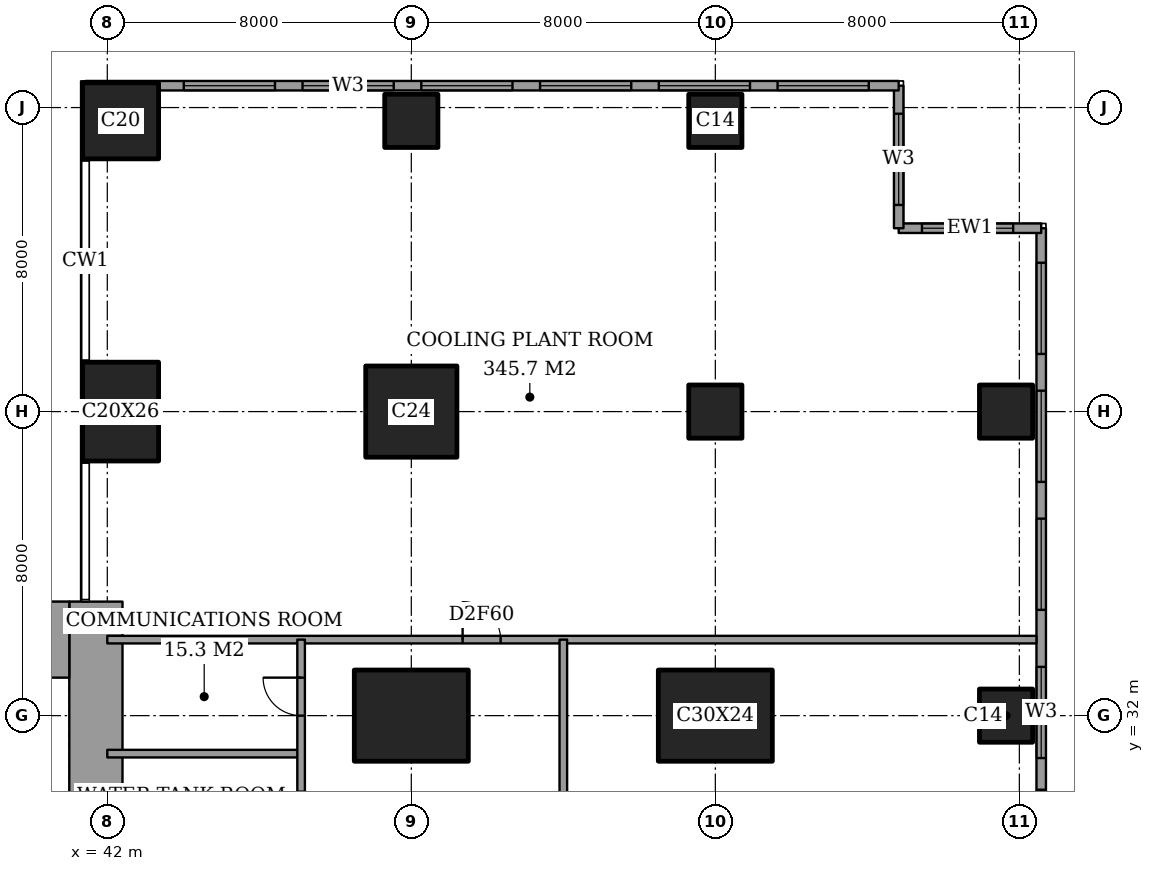
"""IFC4 building model, lengths in metres.
Left out: names, types, materials, properties, quantities, classifications, styles, units other than length and angle.
Written with IfcOpenShell. Run it as: python <this file> out.ifc"""

import sys

from ifc_helpers import new_model, si_unit, direction, frame, frame_2d, origin, origin_2d, place, context, subcontext, project, spatial, rectangle, extrude, element, fill, save


model = new_model("IFC4")
c1 = context("Model", 3, precision=1e-05, world=origin(), true_north=direction((0.0, 1.0)))
c2 = subcontext(c1, "Body", "Model", "MODEL_VIEW")
j1 = project(units=[si_unit("LENGTHUNIT", "METRE"), si_unit("PLANEANGLEUNIT", "RADIAN")], contexts=[c1])
p1 = place(None, origin())
s1 = spatial("IfcSite", under=j1, at=p1, CompositionType="ELEMENT")
p2 = place(p1, origin())
s2 = spatial("IfcBuilding", under=s1, at=p2, CompositionType="ELEMENT")
p3 = place(p2, frame((0.0, 0.0, 296.6)))
s3 = spatial("IfcBuildingStorey", under=s2, at=p3, CompositionType="ELEMENT", Elevation=296.6)
p4 = place(p3, frame((42.35, 40.0, 0.0), z_axis=(0.0, 0.0, 1.0), x_axis=(1.0, 0.0, 0.0)))
e1 = element("IfcColumn", 1, at=p4, inside=s3, PredefinedType="COLUMN", context=c2, shape_type="SweptSolid", body=[
    extrude(rectangle(XDim=2.0, YDim=2.6, at=origin_2d()), origin(), (0.0, 0.0, 1.0), 5.0),
])
p5 = place(p3, frame((42.35, 47.65, 0.0), z_axis=(0.0, 0.0, 1.0), x_axis=(1.0, 0.0, 0.0)))
e2 = element("IfcColumn", 2, at=p5, inside=s3, PredefinedType="COLUMN", context=c2, shape_type="SweptSolid", body=[
    extrude(rectangle(XDim=2.0, YDim=2.0, at=origin_2d()), origin(), (0.0, 0.0, 1.0), 5.0),
])
p6 = place(p3, frame((50.0, 32.0, 0.0), z_axis=(0.0, 0.0, 1.0), x_axis=(1.0, 0.0, 0.0)))
e3 = element("IfcColumn", 3, at=p6, inside=s3, PredefinedType="COLUMN", context=c2, shape_type="SweptSolid", body=[
    extrude(rectangle(XDim=3.0, YDim=2.4, at=origin_2d()), origin(), (0.0, 0.0, 1.0), 5.0),
])
p7 = place(p3, frame((50.0, 40.0, 0.0), z_axis=(0.0, 0.0, 1.0), x_axis=(1.0, 0.0, 0.0)))
e4 = element("IfcColumn", 4, at=p7, inside=s3, PredefinedType="COLUMN", context=c2, shape_type="SweptSolid", body=[
    extrude(rectangle(XDim=2.4, YDim=2.4, at=origin_2d()), origin(), (0.0, 0.0, 1.0), 5.0),
])
p8 = place(p3, frame((50.0, 47.65, 0.0), z_axis=(0.0, 0.0, 1.0), x_axis=(1.0, 0.0, 0.0)))
e5 = element("IfcColumn", 5, at=p8, inside=s3, PredefinedType="COLUMN", context=c2, shape_type="SweptSolid", body=[
    extrude(rectangle(XDim=1.4, YDim=1.4, at=origin_2d()), origin(), (0.0, 0.0, 1.0), 5.0),
])
p9 = place(p3, frame((58.0, 32.0, 0.0), z_axis=(0.0, 0.0, 1.0), x_axis=(1.0, 0.0, 0.0)))
e6 = element("IfcColumn", 6, at=p9, inside=s3, PredefinedType="COLUMN", context=c2, shape_type="SweptSolid", body=[
    extrude(rectangle(XDim=3.0, YDim=2.4, at=origin_2d()), origin(), (0.0, 0.0, 1.0), 5.0),
])
for number, where, z_axis, x_axis in (
    (7, (58.0, 40.0, 0.0), (0.0, 0.0, 1.0), (1.0, 0.0, 0.0)),
    (8, (58.0, 47.65, 0.0), (0.0, 0.0, 1.0), (1.0, 0.0, 0.0)),
    (9, (65.65, 32.0, 0.0), (0.0, 0.0, 1.0), (1.0, 0.0, 0.0)),
    (10, (65.65, 40.0, 0.0), (0.0, 0.0, 1.0), (1.0, 0.0, 0.0)),
):
    element("IfcColumn", number, at=place(p3, frame(where, z_axis=z_axis, x_axis=x_axis)), inside=s3, PredefinedType="COLUMN", context=c2, shape_type="SweptSolid", body=[
        extrude(rectangle(XDim=1.4, YDim=1.4, at=origin_2d()), origin(), (0.0, 0.0, 1.0), 5.0),
    ])
p10 = place(p3, frame((37.85, 34.0, 0.0), z_axis=(0.0, 0.0, 1.0), x_axis=(1.0, 0.0, 0.0)))
e11 = element("IfcWall", 11, at=p10, inside=s3, PredefinedType="SHEAR", context=c2, shape_type="SweptSolid", body=[
    extrude(rectangle(XDim=3.15, YDim=2.0, at=frame_2d((1.575, 0.0))), origin(), (0.0, 0.0, 1.0), 5.0),
])
p11 = place(p3, frame((41.7, 24.85, 0.0), z_axis=(0.0, 0.0, 1.0), x_axis=(0.0, 1.0, 0.0)))
e12 = element("IfcWall", 12, at=p11, inside=s3, PredefinedType="SHEAR", context=c2, shape_type="SweptSolid", body=[
    extrude(rectangle(XDim=10.15, YDim=1.4, at=frame_2d((5.075, 0.0))), origin(), (0.0, 0.0, 1.0), 5.0),
])
p12 = place(p3, frame((66.575, 3.175, 0.0), z_axis=(0.0, 0.0, 1.0), x_axis=(0.0, 1.0, 0.0)))
e13 = element("IfcWall", 13, at=p12, inside=s3, PredefinedType="SOLIDWALL", context=c2, shape_type="SweptSolid", body=[
    extrude(rectangle(XDim=41.65, YDim=0.25, at=frame_2d((20.825, 0.0))), origin(), (0.0, 0.0, 1.0), 5.0),
])
p13 = place(p12, frame((0.908, 0.0, 0.6)))
e14 = element("IfcOpeningElement", 14, at=p13, cuts=e13, PredefinedType="OPENING", context=c2, shape_type="SweptSolid", body=[
    extrude(rectangle(XDim=2.4, YDim=3.0, at=frame_2d((1.2, 1.5))), frame((0.0, 0.135, 0.0), z_axis=(0.0, -1.0, 0.0), x_axis=(1.0, 0.0, 0.0)), (0.0, 0.0, 1.0), 0.27),
])
p14 = place(p12, frame((4.275, 0.0, 0.6)))
e15 = element("IfcOpeningElement", 15, at=p14, cuts=e13, PredefinedType="OPENING", context=c2, shape_type="SweptSolid", body=[
    extrude(rectangle(XDim=2.4, YDim=3.0, at=frame_2d((1.2, 1.5))), frame((0.0, 0.135, 0.0), z_axis=(0.0, -1.0, 0.0), x_axis=(1.0, 0.0, 0.0)), (0.0, 0.0, 1.0), 0.27),
])
p15 = place(p12, frame((7.642, 0.0, 0.6)))
e16 = element("IfcOpeningElement", 16, at=p15, cuts=e13, PredefinedType="OPENING", context=c2, shape_type="SweptSolid", body=[
    extrude(rectangle(XDim=2.4, YDim=3.0, at=frame_2d((1.2, 1.5))), frame((0.0, 0.135, 0.0), z_axis=(0.0, -1.0, 0.0), x_axis=(1.0, 0.0, 0.0)), (0.0, 0.0, 1.0), 0.27),
])
p16 = place(p12, frame((11.542, 0.0, 0.6)))
e17 = element("IfcOpeningElement", 17, at=p16, cuts=e13, PredefinedType="OPENING", context=c2, shape_type="SweptSolid", body=[
    extrude(rectangle(XDim=2.4, YDim=3.0, at=frame_2d((1.2, 1.5))), frame((0.0, 0.135, 0.0), z_axis=(0.0, -1.0, 0.0), x_axis=(1.0, 0.0, 0.0)), (0.0, 0.0, 1.0), 0.27),
])
p17 = place(p12, frame((14.775, 0.0, 0.6)))
e18 = element("IfcOpeningElement", 18, at=p17, cuts=e13, PredefinedType="OPENING", context=c2, shape_type="SweptSolid", body=[
    extrude(rectangle(XDim=2.4, YDim=3.0, at=frame_2d((1.2, 1.5))), frame((0.0, 0.135, 0.0), z_axis=(0.0, -1.0, 0.0), x_axis=(1.0, 0.0, 0.0)), (0.0, 0.0, 1.0), 0.27),
])
p18 = place(p12, frame((18.008, 0.0, 0.6)))
e19 = element("IfcOpeningElement", 19, at=p18, cuts=e13, PredefinedType="OPENING", context=c2, shape_type="SweptSolid", body=[
    extrude(rectangle(XDim=2.4, YDim=3.0, at=frame_2d((1.2, 1.5))), frame((0.0, 0.135, 0.0), z_axis=(0.0, -1.0, 0.0), x_axis=(1.0, 0.0, 0.0)), (0.0, 0.0, 1.0), 0.27),
])
p19 = place(p12, frame((21.242, 0.0, 0.6)))
e20 = element("IfcOpeningElement", 20, at=p19, cuts=e13, PredefinedType="OPENING", context=c2, shape_type="SweptSolid", body=[
    extrude(rectangle(XDim=2.4, YDim=3.0, at=frame_2d((1.2, 1.5))), frame((0.0, 0.135, 0.0), z_axis=(0.0, -1.0, 0.0), x_axis=(1.0, 0.0, 0.0)), (0.0, 0.0, 1.0), 0.27),
])
p20 = place(p12, frame((24.475, 0.0, 0.6)))
e21 = element("IfcOpeningElement", 21, at=p20, cuts=e13, PredefinedType="OPENING", context=c2, shape_type="SweptSolid", body=[
    extrude(rectangle(XDim=2.4, YDim=3.0, at=frame_2d((1.2, 1.5))), frame((0.0, 0.135, 0.0), z_axis=(0.0, -1.0, 0.0), x_axis=(1.0, 0.0, 0.0)), (0.0, 0.0, 1.0), 0.27),
])
p21 = place(p12, frame((27.708, 0.0, 0.6)))
e22 = element("IfcOpeningElement", 22, at=p21, cuts=e13, PredefinedType="OPENING", context=c2, shape_type="SweptSolid", body=[
    extrude(rectangle(XDim=2.4, YDim=3.0, at=frame_2d((1.2, 1.5))), frame((0.0, 0.135, 0.0), z_axis=(0.0, -1.0, 0.0), x_axis=(1.0, 0.0, 0.0)), (0.0, 0.0, 1.0), 0.27),
])
p22 = place(p12, frame((31.608, 0.0, 0.6)))
e23 = element("IfcOpeningElement", 23, at=p22, cuts=e13, PredefinedType="OPENING", context=c2, shape_type="SweptSolid", body=[
    extrude(rectangle(XDim=2.4, YDim=3.0, at=frame_2d((1.2, 1.5))), frame((0.0, 0.135, 0.0), z_axis=(0.0, -1.0, 0.0), x_axis=(1.0, 0.0, 0.0)), (0.0, 0.0, 1.0), 0.27),
])
p23 = place(p12, frame((34.975, 0.0, 0.6)))
e24 = element("IfcOpeningElement", 24, at=p23, cuts=e13, PredefinedType="OPENING", context=c2, shape_type="SweptSolid", body=[
    extrude(rectangle(XDim=2.4, YDim=3.0, at=frame_2d((1.2, 1.5))), frame((0.0, 0.135, 0.0), z_axis=(0.0, -1.0, 0.0), x_axis=(1.0, 0.0, 0.0)), (0.0, 0.0, 1.0), 0.27),
])
p24 = place(p12, frame((38.342, 0.0, 0.6)))
e25 = element("IfcOpeningElement", 25, at=p24, cuts=e13, PredefinedType="OPENING", context=c2, shape_type="SweptSolid", body=[
    extrude(rectangle(XDim=2.4, YDim=3.0, at=frame_2d((1.2, 1.5))), frame((0.0, 0.135, 0.0), z_axis=(0.0, -1.0, 0.0), x_axis=(1.0, 0.0, 0.0)), (0.0, 0.0, 1.0), 0.27),
])
p25 = place(p3, frame((66.575, 44.825, 0.0), z_axis=(0.0, 0.0, 1.0), x_axis=(-1.0, 0.0, 0.0)))
e26 = element("IfcWall", 26, at=p25, inside=s3, PredefinedType="SOLIDWALL", context=c2, shape_type="SweptSolid", body=[
    extrude(rectangle(XDim=3.75, YDim=0.25, at=frame_2d((1.875, 0.0))), origin(), (0.0, 0.0, 1.0), 5.0),
])
p26 = place(p25, frame((0.738, 0.0, 0.6)))
e27 = element("IfcOpeningElement", 27, at=p26, cuts=e26, PredefinedType="OPENING", context=c2, shape_type="SweptSolid", body=[
    extrude(rectangle(XDim=2.4, YDim=3.0, at=frame_2d((1.2, 1.5))), frame((0.0, 0.135, 0.0), z_axis=(0.0, -1.0, 0.0), x_axis=(1.0, 0.0, 0.0)), (0.0, 0.0, 1.0), 0.27),
])
p27 = place(p3, frame((62.825, 44.825, 0.0), z_axis=(0.0, 0.0, 1.0), x_axis=(0.0, 1.0, 0.0)))
e28 = element("IfcWall", 28, at=p27, inside=s3, PredefinedType="SOLIDWALL", context=c2, shape_type="SweptSolid", body=[
    extrude(rectangle(XDim=3.75, YDim=0.25, at=frame_2d((1.875, 0.0))), origin(), (0.0, 0.0, 1.0), 5.0),
])
p28 = place(p27, frame((0.613, 0.0, 0.6)))
e29 = element("IfcOpeningElement", 29, at=p28, cuts=e28, PredefinedType="OPENING", context=c2, shape_type="SweptSolid", body=[
    extrude(rectangle(XDim=2.4, YDim=3.0, at=frame_2d((1.2, 1.5))), frame((0.0, 0.135, 0.0), z_axis=(0.0, -1.0, 0.0), x_axis=(1.0, 0.0, 0.0)), (0.0, 0.0, 1.0), 0.27),
])
p29 = place(p3, frame((62.825, 48.575, 0.0), z_axis=(0.0, 0.0, 1.0), x_axis=(-1.0, 0.0, 0.0)))
e30 = element("IfcWall", 30, at=p29, inside=s3, PredefinedType="SOLIDWALL", context=c2, shape_type="SweptSolid", body=[
    extrude(rectangle(XDim=21.4, YDim=0.25, at=frame_2d((10.7, 0.0))), origin(), (0.0, 0.0, 1.0), 5.0),
])
p30 = place(p29, frame((0.788, 0.0, 0.6)))
e31 = element("IfcOpeningElement", 31, at=p30, cuts=e30, PredefinedType="OPENING", context=c2, shape_type="SweptSolid", body=[
    extrude(rectangle(XDim=2.4, YDim=3.0, at=frame_2d((1.2, 1.5))), frame((0.0, 0.135, 0.0), z_axis=(0.0, -1.0, 0.0), x_axis=(1.0, 0.0, 0.0)), (0.0, 0.0, 1.0), 0.27),
])
p31 = place(p29, frame((3.913, 0.0, 0.6)))
e32 = element("IfcOpeningElement", 32, at=p31, cuts=e30, PredefinedType="OPENING", context=c2, shape_type="SweptSolid", body=[
    extrude(rectangle(XDim=2.4, YDim=3.0, at=frame_2d((1.2, 1.5))), frame((0.0, 0.135, 0.0), z_axis=(0.0, -1.0, 0.0), x_axis=(1.0, 0.0, 0.0)), (0.0, 0.0, 1.0), 0.27),
])
p32 = place(p29, frame((7.038, 0.0, 0.6)))
e33 = element("IfcOpeningElement", 33, at=p32, cuts=e30, PredefinedType="OPENING", context=c2, shape_type="SweptSolid", body=[
    extrude(rectangle(XDim=2.4, YDim=3.0, at=frame_2d((1.2, 1.5))), frame((0.0, 0.135, 0.0), z_axis=(0.0, -1.0, 0.0), x_axis=(1.0, 0.0, 0.0)), (0.0, 0.0, 1.0), 0.27),
])
p33 = place(p29, frame((10.163, 0.0, 0.6)))
e34 = element("IfcOpeningElement", 34, at=p33, cuts=e30, PredefinedType="OPENING", context=c2, shape_type="SweptSolid", body=[
    extrude(rectangle(XDim=2.4, YDim=3.0, at=frame_2d((1.2, 1.5))), frame((0.0, 0.135, 0.0), z_axis=(0.0, -1.0, 0.0), x_axis=(1.0, 0.0, 0.0)), (0.0, 0.0, 1.0), 0.27),
])
p34 = place(p29, frame((13.288, 0.0, 0.6)))
e35 = element("IfcOpeningElement", 35, at=p34, cuts=e30, PredefinedType="OPENING", context=c2, shape_type="SweptSolid", body=[
    extrude(rectangle(XDim=2.4, YDim=3.0, at=frame_2d((1.2, 1.5))), frame((0.0, 0.135, 0.0), z_axis=(0.0, -1.0, 0.0), x_axis=(1.0, 0.0, 0.0)), (0.0, 0.0, 1.0), 0.27),
])
p35 = place(p29, frame((16.413, 0.0, 0.6)))
e36 = element("IfcOpeningElement", 36, at=p35, cuts=e30, PredefinedType="OPENING", context=c2, shape_type="SweptSolid", body=[
    extrude(rectangle(XDim=2.4, YDim=3.0, at=frame_2d((1.2, 1.5))), frame((0.0, 0.135, 0.0), z_axis=(0.0, -1.0, 0.0), x_axis=(1.0, 0.0, 0.0)), (0.0, 0.0, 1.0), 0.27),
])
p36 = place(p3, frame((42.0, 31.0, 0.0), z_axis=(0.0, 0.0, 1.0), x_axis=(1.0, 0.0, 0.0)))
e37 = element("IfcWall", 37, at=p36, inside=s3, PredefinedType="PARTITIONING", context=c2, shape_type="SweptSolid", body=[
    extrude(rectangle(XDim=5.1, YDim=0.2, at=frame_2d((2.55, 0.0))), origin(), (0.0, 0.0, 1.0), 4.7),
])
p37 = place(p3, frame((42.0, 34.0, 0.0), z_axis=(0.0, 0.0, 1.0), x_axis=(1.0, 0.0, 0.0)))
e38 = element("IfcWall", 38, at=p37, inside=s3, PredefinedType="PARTITIONING", context=c2, shape_type="SweptSolid", body=[
    extrude(rectangle(XDim=24.45, YDim=0.2, at=frame_2d((12.225, 0.0))), origin(), (0.0, 0.0, 1.0), 4.7),
])
p38 = place(p37, frame((9.35, 0.0, 0.0)))
e39 = element("IfcOpeningElement", 39, at=p38, cuts=e38, PredefinedType="OPENING", context=c2, shape_type="SweptSolid", body=[
    extrude(rectangle(XDim=1.0, YDim=2.1, at=frame_2d((0.5, 1.05))), frame((0.0, 0.11, 0.0), z_axis=(0.0, -1.0, 0.0), x_axis=(1.0, 0.0, 0.0)), (0.0, 0.0, 1.0), 0.22),
])
p39 = place(p3, frame((47.1, 28.0, 0.0), z_axis=(0.0, 0.0, 1.0), x_axis=(0.0, 1.0, 0.0)))
e40 = element("IfcWall", 40, at=p39, inside=s3, PredefinedType="PARTITIONING", context=c2, shape_type="SweptSolid", body=[
    extrude(rectangle(XDim=6.0, YDim=0.2, at=frame_2d((3.0, 0.0))), origin(), (0.0, 0.0, 1.0), 4.7),
])
p40 = place(p39, frame((1.0, 0.0, 0.0)))
e41 = element("IfcOpeningElement", 41, at=p40, cuts=e40, PredefinedType="OPENING", context=c2, shape_type="SweptSolid", body=[
    extrude(rectangle(XDim=1.0, YDim=2.1, at=frame_2d((0.5, 1.05))), frame((0.0, 0.11, 0.0), z_axis=(0.0, -1.0, 0.0), x_axis=(1.0, 0.0, 0.0)), (0.0, 0.0, 1.0), 0.22),
])
p41 = place(p39, frame((4.0, 0.0, 0.0)))
e42 = element("IfcOpeningElement", 42, at=p41, cuts=e40, PredefinedType="OPENING", context=c2, shape_type="SweptSolid", body=[
    extrude(rectangle(XDim=1.0, YDim=2.1, at=frame_2d((0.5, 1.05))), frame((0.0, 0.11, 0.0), z_axis=(0.0, -1.0, 0.0), x_axis=(1.0, 0.0, 0.0)), (0.0, 0.0, 1.0), 0.22),
])
p42 = place(p3, frame((54.0, 14.0, 0.0), z_axis=(0.0, 0.0, 1.0), x_axis=(0.0, 1.0, 0.0)))
e43 = element("IfcWall", 43, at=p42, inside=s3, PredefinedType="PARTITIONING", context=c2, shape_type="SweptSolid", body=[
    extrude(rectangle(XDim=20.0, YDim=0.2, at=frame_2d((10.0, 0.0))), origin(), (0.0, 0.0, 1.0), 4.7),
])
p43 = place(p42, frame((9.5, 0.0, 0.0)))
e44 = element("IfcOpeningElement", 44, at=p43, cuts=e43, PredefinedType="OPENING", context=c2, shape_type="SweptSolid", body=[
    extrude(rectangle(XDim=1.0, YDim=2.1, at=frame_2d((0.5, 1.05))), frame((0.0, 0.11, 0.0), z_axis=(0.0, -1.0, 0.0), x_axis=(1.0, 0.0, 0.0)), (0.0, 0.0, 1.0), 0.22),
])
p44 = place(p20, origin())
e45 = element("IfcWindow", 45, at=p44, inside=s3, PartitioningType="SINGLE_PANEL", PredefinedType="WINDOW", context=c2, shape_type="SweptSolid", body=[
    extrude(rectangle(XDim=2.4, YDim=3.0, at=frame_2d((1.2, 1.5))), frame((0.0, 0.03, 0.0), z_axis=(0.0, -1.0, 0.0), x_axis=(1.0, 0.0, 0.0)), (0.0, 0.0, 1.0), 0.06),
])
fill(e21, e45)
p45 = place(p21, origin())
e46 = element("IfcWindow", 46, at=p45, inside=s3, PartitioningType="SINGLE_PANEL", PredefinedType="WINDOW", context=c2, shape_type="SweptSolid", body=[
    extrude(rectangle(XDim=2.4, YDim=3.0, at=frame_2d((1.2, 1.5))), frame((0.0, 0.03, 0.0), z_axis=(0.0, -1.0, 0.0), x_axis=(1.0, 0.0, 0.0)), (0.0, 0.0, 1.0), 0.06),
])
fill(e22, e46)
p46 = place(p22, origin())
e47 = element("IfcWindow", 47, at=p46, inside=s3, PartitioningType="SINGLE_PANEL", PredefinedType="WINDOW", context=c2, shape_type="SweptSolid", body=[
    extrude(rectangle(XDim=2.4, YDim=3.0, at=frame_2d((1.2, 1.5))), frame((0.0, 0.03, 0.0), z_axis=(0.0, -1.0, 0.0), x_axis=(1.0, 0.0, 0.0)), (0.0, 0.0, 1.0), 0.06),
])
fill(e23, e47)
p47 = place(p23, origin())
e48 = element("IfcWindow", 48, at=p47, inside=s3, PartitioningType="SINGLE_PANEL", PredefinedType="WINDOW", context=c2, shape_type="SweptSolid", body=[
    extrude(rectangle(XDim=2.4, YDim=3.0, at=frame_2d((1.2, 1.5))), frame((0.0, 0.03, 0.0), z_axis=(0.0, -1.0, 0.0), x_axis=(1.0, 0.0, 0.0)), (0.0, 0.0, 1.0), 0.06),
])
fill(e24, e48)
p48 = place(p24, origin())
e49 = element("IfcWindow", 49, at=p48, inside=s3, PartitioningType="SINGLE_PANEL", PredefinedType="WINDOW", context=c2, shape_type="SweptSolid", body=[
    extrude(rectangle(XDim=2.4, YDim=3.0, at=frame_2d((1.2, 1.5))), frame((0.0, 0.03, 0.0), z_axis=(0.0, -1.0, 0.0), x_axis=(1.0, 0.0, 0.0)), (0.0, 0.0, 1.0), 0.06),
])
fill(e25, e49)
p49 = place(p26, origin())
e50 = element("IfcWindow", 50, at=p49, inside=s3, PartitioningType="SINGLE_PANEL", PredefinedType="WINDOW", context=c2, shape_type="SweptSolid", body=[
    extrude(rectangle(XDim=2.4, YDim=3.0, at=frame_2d((1.2, 1.5))), frame((0.0, 0.03, 0.0), z_axis=(0.0, -1.0, 0.0), x_axis=(1.0, 0.0, 0.0)), (0.0, 0.0, 1.0), 0.06),
])
fill(e27, e50)
p50 = place(p28, origin())
e51 = element("IfcWindow", 51, at=p50, inside=s3, PartitioningType="SINGLE_PANEL", PredefinedType="WINDOW", context=c2, shape_type="SweptSolid", body=[
    extrude(rectangle(XDim=2.4, YDim=3.0, at=frame_2d((1.2, 1.5))), frame((0.0, 0.03, 0.0), z_axis=(0.0, -1.0, 0.0), x_axis=(1.0, 0.0, 0.0)), (0.0, 0.0, 1.0), 0.06),
])
fill(e29, e51)
p51 = place(p30, origin())
e52 = element("IfcWindow", 52, at=p51, inside=s3, PartitioningType="SINGLE_PANEL", PredefinedType="WINDOW", context=c2, shape_type="SweptSolid", body=[
    extrude(rectangle(XDim=2.4, YDim=3.0, at=frame_2d((1.2, 1.5))), frame((0.0, 0.03, 0.0), z_axis=(0.0, -1.0, 0.0), x_axis=(1.0, 0.0, 0.0)), (0.0, 0.0, 1.0), 0.06),
])
fill(e31, e52)
p52 = place(p31, origin())
e53 = element("IfcWindow", 53, at=p52, inside=s3, PartitioningType="SINGLE_PANEL", PredefinedType="WINDOW", context=c2, shape_type="SweptSolid", body=[
    extrude(rectangle(XDim=2.4, YDim=3.0, at=frame_2d((1.2, 1.5))), frame((0.0, 0.03, 0.0), z_axis=(0.0, -1.0, 0.0), x_axis=(1.0, 0.0, 0.0)), (0.0, 0.0, 1.0), 0.06),
])
fill(e32, e53)
p53 = place(p32, origin())
e54 = element("IfcWindow", 54, at=p53, inside=s3, PartitioningType="SINGLE_PANEL", PredefinedType="WINDOW", context=c2, shape_type="SweptSolid", body=[
    extrude(rectangle(XDim=2.4, YDim=3.0, at=frame_2d((1.2, 1.5))), frame((0.0, 0.03, 0.0), z_axis=(0.0, -1.0, 0.0), x_axis=(1.0, 0.0, 0.0)), (0.0, 0.0, 1.0), 0.06),
])
fill(e33, e54)
p54 = place(p33, origin())
e55 = element("IfcWindow", 55, at=p54, inside=s3, PartitioningType="SINGLE_PANEL", PredefinedType="WINDOW", context=c2, shape_type="SweptSolid", body=[
    extrude(rectangle(XDim=2.4, YDim=3.0, at=frame_2d((1.2, 1.5))), frame((0.0, 0.03, 0.0), z_axis=(0.0, -1.0, 0.0), x_axis=(1.0, 0.0, 0.0)), (0.0, 0.0, 1.0), 0.06),
])
fill(e34, e55)
p55 = place(p34, origin())
e56 = element("IfcWindow", 56, at=p55, inside=s3, PartitioningType="SINGLE_PANEL", PredefinedType="WINDOW", context=c2, shape_type="SweptSolid", body=[
    extrude(rectangle(XDim=2.4, YDim=3.0, at=frame_2d((1.2, 1.5))), frame((0.0, 0.03, 0.0), z_axis=(0.0, -1.0, 0.0), x_axis=(1.0, 0.0, 0.0)), (0.0, 0.0, 1.0), 0.06),
])
fill(e35, e56)
p56 = place(p35, origin())
e57 = element("IfcWindow", 57, at=p56, inside=s3, PartitioningType="SINGLE_PANEL", PredefinedType="WINDOW", context=c2, shape_type="SweptSolid", body=[
    extrude(rectangle(XDim=2.4, YDim=3.0, at=frame_2d((1.2, 1.5))), frame((0.0, 0.03, 0.0), z_axis=(0.0, -1.0, 0.0), x_axis=(1.0, 0.0, 0.0)), (0.0, 0.0, 1.0), 0.06),
])
fill(e36, e57)
p57 = place(p38, origin())
e58 = element("IfcDoor", 58, at=p57, inside=s3, OperationType="SINGLE_SWING_RIGHT", PredefinedType="DOOR", context=c2, shape_type="SweptSolid", body=[
    extrude(rectangle(XDim=1.0, YDim=2.1, at=frame_2d((0.5, 1.05))), frame((0.0, 0.025, 0.0), z_axis=(0.0, -1.0, 0.0), x_axis=(1.0, 0.0, 0.0)), (0.0, 0.0, 1.0), 0.05),
])
fill(e39, e58)
p58 = place(p41, origin())
e59 = element("IfcDoor", 59, at=p58, inside=s3, OperationType="SINGLE_SWING_LEFT", PredefinedType="DOOR", context=c2, shape_type="SweptSolid", body=[
    extrude(rectangle(XDim=1.0, YDim=2.1, at=frame_2d((0.5, 1.05))), frame((0.0, 0.025, 0.0), z_axis=(0.0, -1.0, 0.0), x_axis=(1.0, 0.0, 0.0)), (0.0, 0.0, 1.0), 0.05),
])
fill(e42, e59)
save(model, sys.argv[1])
